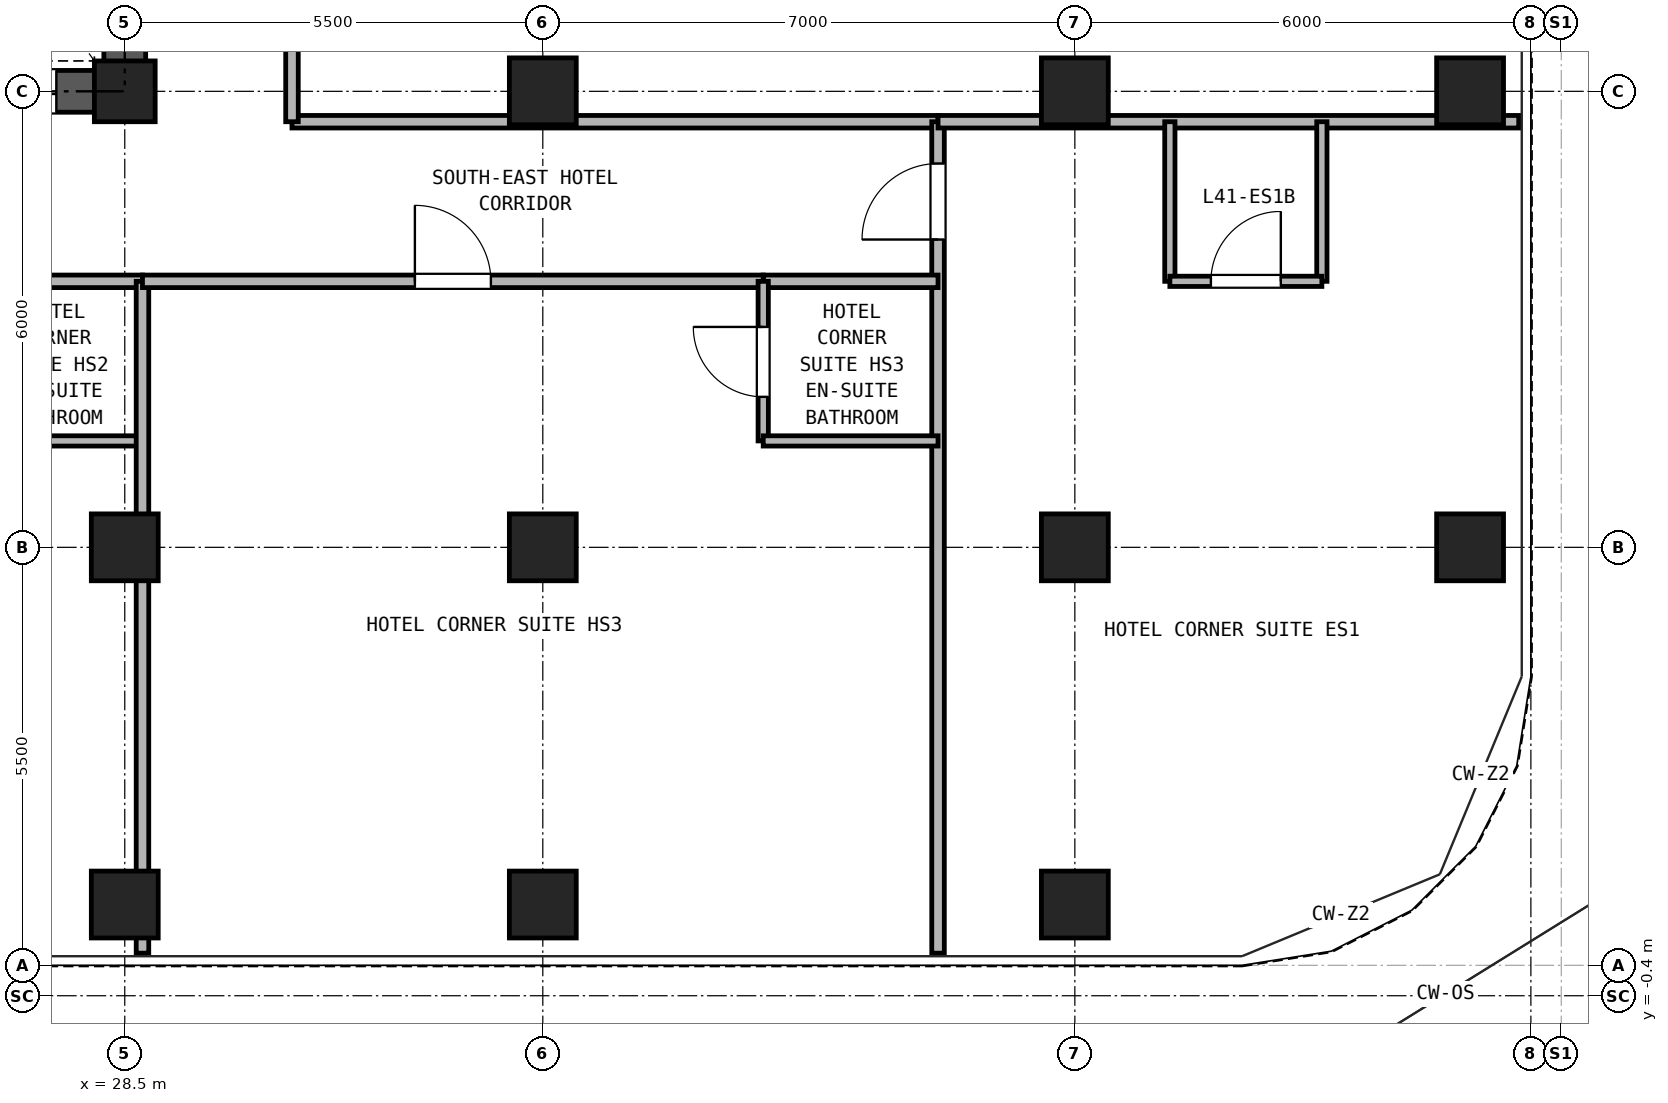
"""IFC4 building model, lengths in metres.
Left out: names, types, materials, properties, quantities, classifications, styles, units other than length and angle.
Written with IfcOpenShell. Run it as: python <this file> out.ifc"""

import sys

from ifc_helpers import new_model, si_unit, direction, frame, frame_2d, origin, origin_2d, place, context, subcontext, project, spatial, rectangle, hollow_rectangle, extrude, source, transform, mapped, element, fill, save


model = new_model("IFC4")
c1 = context("Model", 3, precision=1e-05, world=origin(), true_north=direction((0.0, 1.0)))
c2 = subcontext(c1, "Body", "Model", "MODEL_VIEW")
j1 = project(units=[si_unit("LENGTHUNIT", "METRE"), si_unit("PLANEANGLEUNIT", "RADIAN")], contexts=[c1])
p1 = place(None, origin())
s1 = spatial("IfcSite", under=j1, at=p1, CompositionType="ELEMENT")
p2 = place(p1, origin())
s2 = spatial("IfcBuilding", under=s1, at=p2, CompositionType="ELEMENT")
p3 = place(p2, frame((0.0, 0.0, 148.4)))
s3 = spatial("IfcBuildingStorey", under=s2, at=p3, CompositionType="ELEMENT", Elevation=148.4)
m1 = source(origin(), c2, "Body", "SweptSolid", [
    extrude(hollow_rectangle(XDim=0.88, YDim=0.88, WallThickness=0.05, at=origin_2d()), origin(), (0.0, 0.0, 1.0), 2.84),
])
for number, where, z_axis, x_axis in (
    (1, (28.5, 0.8, 0.0), (0.0, 0.0, 1.0), (1.0, 0.0, 0.0)),
    (2, (34.0, 0.8, 0.0), (0.0, 0.0, 1.0), (1.0, 0.0, 0.0)),
    (3, (41.0, 0.8, 0.0), (0.0, 0.0, 1.0), (1.0, 0.0, 0.0)),
    (4, (46.2, 5.5, 0.0), (0.0, 0.0, 1.0), (1.0, 0.0, 0.0)),
    (5, (46.2, 11.5, 0.0), (0.0, 0.0, 1.0), (1.0, 0.0, 0.0)),
    (6, (28.5, 5.5, 0.0), (0.0, 0.0, 1.0), (1.0, 0.0, 0.0)),
):
    element("IfcColumn", number, at=place(p3, frame(where, z_axis=z_axis, x_axis=x_axis)), inside=s3, PredefinedType="COLUMN", context=c2, shape_type="MappedRepresentation", body=[
        mapped(m1, transform((0.0, 0.0, 0.0), x_axis=(1.0, 0.0, 0.0), y_axis=(0.0, 1.0, 0.0), z_axis=(0.0, 0.0, 1.0), scale=1.0)),
    ])
m2 = source(origin(), c2, "Body", "SweptSolid", [
    extrude(hollow_rectangle(XDim=0.8, YDim=0.8, WallThickness=0.045, at=origin_2d()), origin(), (0.0, 0.0, 1.0), 2.84),
])
p4 = place(p3, frame((28.5, 11.5, 0.0), z_axis=(0.0, 0.0, 1.0), x_axis=(1.0, 0.0, 0.0)))
e7 = element("IfcColumn", 7, at=p4, inside=s3, PredefinedType="COLUMN", context=c2, shape_type="MappedRepresentation", body=[
    mapped(m2, transform((0.0, 0.0, 0.0), x_axis=(1.0, 0.0, 0.0), y_axis=(0.0, 1.0, 0.0), z_axis=(0.0, 0.0, 1.0), scale=1.0)),
])
for number, where, z_axis, x_axis in (
    (8, (34.0, 5.5, 0.0), (0.0, 0.0, 1.0), (1.0, 0.0, 0.0)),
    (9, (34.0, 11.5, 0.0), (0.0, 0.0, 1.0), (1.0, 0.0, 0.0)),
    (10, (41.0, 5.5, 0.0), (0.0, 0.0, 1.0), (1.0, 0.0, 0.0)),
    (11, (41.0, 11.5, 0.0), (0.0, 0.0, 1.0), (1.0, 0.0, 0.0)),
):
    element("IfcColumn", number, at=place(p3, frame(where, z_axis=z_axis, x_axis=x_axis)), inside=s3, PredefinedType="COLUMN", context=c2, shape_type="MappedRepresentation", body=[
        mapped(m1, transform((0.0, 0.0, 0.0), x_axis=(1.0, 0.0, 0.0), y_axis=(0.0, 1.0, 0.0), z_axis=(0.0, 0.0, 1.0), scale=1.0)),
    ])
p5 = place(p3, frame((18.225, 11.5, 0.0), z_axis=(0.0, 0.0, 1.0), x_axis=(1.0, 0.0, 0.0)))
e12 = element("IfcWall", 12, at=p5, inside=s3, PredefinedType="SHEAR", context=c2, shape_type="SweptSolid", body=[
    extrude(rectangle(XDim=10.55, YDim=0.55, at=frame_2d((5.275, 0.0))), origin(), (0.0, 0.0, 1.0), 2.84),
])
p6 = place(p5, frame((2.375, 0.0, 0.0)))
e13 = element("IfcOpeningElement", 13, at=p6, cuts=e12, PredefinedType="OPENING", context=c2, shape_type="SweptSolid", body=[
    extrude(rectangle(XDim=0.95, YDim=2.15, at=frame_2d((0.475, 1.075))), frame((0.0, 0.285, 0.0), z_axis=(0.0, -1.0, 0.0), x_axis=(1.0, 0.0, 0.0)), (0.0, 0.0, 1.0), 0.57),
])
p7 = place(p5, frame((5.875, 0.0, 0.0)))
e14 = element("IfcOpeningElement", 14, at=p7, cuts=e12, PredefinedType="OPENING", context=c2, shape_type="SweptSolid", body=[
    extrude(rectangle(XDim=1.1, YDim=2.25, at=frame_2d((0.55, 1.125))), frame((0.0, 0.285, 0.0), z_axis=(0.0, -1.0, 0.0), x_axis=(1.0, 0.0, 0.0)), (0.0, 0.0, 1.0), 0.57),
])
p8 = place(p5, frame((8.275, 0.0, 0.0)))
e15 = element("IfcOpeningElement", 15, at=p8, cuts=e12, PredefinedType="OPENING", context=c2, shape_type="SweptSolid", body=[
    extrude(rectangle(XDim=1.1, YDim=2.25, at=frame_2d((0.55, 1.125))), frame((0.0, 0.285, 0.0), z_axis=(0.0, -1.0, 0.0), x_axis=(1.0, 0.0, 0.0)), (0.0, 0.0, 1.0), 0.57),
])
p9 = place(p3, frame((28.5, 11.775, 0.0), z_axis=(0.0, 0.0, 1.0), x_axis=(0.0, 1.0, 0.0)))
e16 = element("IfcWall", 16, at=p9, inside=s3, PredefinedType="SHEAR", context=c2, shape_type="SweptSolid", body=[
    extrude(rectangle(XDim=16.7, YDim=0.55, at=frame_2d((8.35, 0.0))), origin(), (0.0, 0.0, 1.0), 2.84),
])
p10 = place(p9, frame((7.375, 0.0, 0.0)))
e17 = element("IfcOpeningElement", 17, at=p10, cuts=e16, PredefinedType="OPENING", context=c2, shape_type="SweptSolid", body=[
    extrude(rectangle(XDim=1.15, YDim=2.2, at=frame_2d((0.575, 1.1))), frame((0.0, 0.285, 0.0), z_axis=(0.0, -1.0, 0.0), x_axis=(1.0, 0.0, 0.0)), (0.0, 0.0, 1.0), 0.57),
])
p11 = place(p3, frame((30.7, 11.1, 0.0), z_axis=(0.0, 0.0, 1.0), x_axis=(1.0, 0.0, 0.0)))
e18 = element("IfcWall", 18, at=p11, inside=s3, PredefinedType="PARTITIONING", context=c2, shape_type="SweptSolid", body=[
    extrude(rectangle(XDim=8.5, YDim=0.165, at=frame_2d((4.25, 0.0))), origin(), (0.0, 0.0, 1.0), 2.84),
])
p12 = place(p3, frame((30.7, 11.1, 0.0), z_axis=(0.0, 0.0, 1.0), x_axis=(0.0, 1.0, 0.0)))
e19 = element("IfcWall", 19, at=p12, inside=s3, PredefinedType="PARTITIONING", context=c2, shape_type="SweptSolid", body=[
    extrude(rectangle(XDim=18.5, YDim=0.165, at=frame_2d((9.25, 0.0))), origin(), (0.0, 0.0, 1.0), 2.84),
])
p13 = place(p12, frame((8.75, 0.0, 0.0)))
e20 = element("IfcOpeningElement", 20, at=p13, cuts=e19, PredefinedType="OPENING", context=c2, shape_type="SweptSolid", body=[
    extrude(rectangle(XDim=0.95, YDim=2.15, at=frame_2d((0.475, 1.075))), frame((0.0, 0.093, 0.0), z_axis=(0.0, -1.0, 0.0), x_axis=(1.0, 0.0, 0.0)), (0.0, 0.0, 1.0), 0.185),
])
p14 = place(p3, frame((39.2, 0.16, 0.0), z_axis=(0.0, 0.0, 1.0), x_axis=(0.0, 1.0, 0.0)))
e21 = element("IfcWall", 21, at=p14, inside=s3, PredefinedType="PARTITIONING", context=c2, shape_type="SweptSolid", body=[
    extrude(rectangle(XDim=10.94, YDim=0.165, at=frame_2d((5.47, 0.0))), origin(), (0.0, 0.0, 1.0), 2.84),
])
p15 = place(p14, frame((9.39, 0.0, 0.0)))
e22 = element("IfcOpeningElement", 22, at=p15, cuts=e21, PredefinedType="OPENING", context=c2, shape_type="SweptSolid", body=[
    extrude(rectangle(XDim=1.0, YDim=2.15, at=frame_2d((0.5, 1.075))), frame((0.0, 0.093, 0.0), z_axis=(0.0, -1.0, 0.0), x_axis=(1.0, 0.0, 0.0)), (0.0, 0.0, 1.0), 0.185),
])
p16 = place(p3, frame((39.2, 11.1, 0.0), z_axis=(0.0, 0.0, 1.0), x_axis=(1.0, 0.0, 0.0)))
e23 = element("IfcWall", 23, at=p16, inside=s3, PredefinedType="PARTITIONING", context=c2, shape_type="SweptSolid", body=[
    extrude(rectangle(XDim=7.64, YDim=0.165, at=frame_2d((3.82, 0.0))), origin(), (0.0, 0.0, 1.0), 2.84),
])
for number, where, z_axis, x_axis in (
    (24, (42.25, 9.0, 0.0), (0.0, 0.0, 1.0), (0.0, 1.0, 0.0)),
    (25, (44.25, 9.0, 0.0), (0.0, 0.0, 1.0), (0.0, 1.0, 0.0)),
):
    element("IfcWall", number, at=place(p3, frame(where, z_axis=z_axis, x_axis=x_axis)), inside=s3, PredefinedType="PARTITIONING", context=c2, shape_type="SweptSolid", body=[
        extrude(rectangle(XDim=2.1, YDim=0.135, at=frame_2d((1.05, 0.0))), origin(), (0.0, 0.0, 1.0), 2.84),
    ])
p17 = place(p3, frame((42.25, 9.0, 0.0), z_axis=(0.0, 0.0, 1.0), x_axis=(1.0, 0.0, 0.0)))
e26 = element("IfcWall", 26, at=p17, inside=s3, PredefinedType="PARTITIONING", context=c2, shape_type="SweptSolid", body=[
    extrude(rectangle(XDim=2.0, YDim=0.135, at=frame_2d((1.0, 0.0))), origin(), (0.0, 0.0, 1.0), 2.84),
])
p18 = place(p17, frame((0.54, 0.0, 0.0)))
e27 = element("IfcOpeningElement", 27, at=p18, cuts=e26, PredefinedType="OPENING", context=c2, shape_type="SweptSolid", body=[
    extrude(rectangle(XDim=0.92, YDim=2.1, at=frame_2d((0.46, 1.05))), frame((0.0, 0.077, 0.0), z_axis=(0.0, -1.0, 0.0), x_axis=(1.0, 0.0, 0.0)), (0.0, 0.0, 1.0), 0.155),
])
p19 = place(p3, frame((26.433, 9.0, 0.0), z_axis=(0.0, 0.0, 1.0), x_axis=(1.0, 0.0, 0.0)))
e28 = element("IfcWall", 28, at=p19, inside=s3, PredefinedType="PARTITIONING", context=c2, shape_type="SweptSolid", body=[
    extrude(rectangle(XDim=2.3, YDim=0.165, at=frame_2d((1.15, 0.0))), origin(), (0.0, 0.0, 1.0), 2.84),
])
p20 = place(p3, frame((26.433, 6.9, 0.0), z_axis=(0.0, 0.0, 1.0), x_axis=(1.0, 0.0, 0.0)))
e29 = element("IfcWall", 29, at=p20, inside=s3, PredefinedType="PARTITIONING", context=c2, shape_type="SweptSolid", body=[
    extrude(rectangle(XDim=2.3, YDim=0.135, at=frame_2d((1.15, 0.0))), origin(), (0.0, 0.0, 1.0), 2.84),
])
p21 = place(p3, frame((28.733, 0.16, 0.0), z_axis=(0.0, 0.0, 1.0), x_axis=(0.0, 1.0, 0.0)))
e30 = element("IfcWall", 30, at=p21, inside=s3, PredefinedType="PARTITIONING", context=c2, shape_type="SweptSolid", body=[
    extrude(rectangle(XDim=8.84, YDim=0.165, at=frame_2d((4.42, 0.0))), origin(), (0.0, 0.0, 1.0), 2.137),
])
p22 = place(p3, frame((36.9, 9.0, 0.0), z_axis=(0.0, 0.0, 1.0), x_axis=(1.0, 0.0, 0.0)))
e31 = element("IfcWall", 31, at=p22, inside=s3, PredefinedType="PARTITIONING", context=c2, shape_type="SweptSolid", body=[
    extrude(rectangle(XDim=2.3, YDim=0.165, at=frame_2d((1.15, 0.0))), origin(), (0.0, 0.0, 1.0), 2.84),
])
p23 = place(p3, frame((28.733, 9.0, 0.0), z_axis=(0.0, 0.0, 1.0), x_axis=(1.0, 0.0, 0.0)))
e32 = element("IfcWall", 32, at=p23, inside=s3, PredefinedType="PARTITIONING", context=c2, shape_type="SweptSolid", body=[
    extrude(rectangle(XDim=8.167, YDim=0.165, at=frame_2d((4.083, 0.0))), origin(), (0.0, 0.0, 1.0), 2.84),
])
p24 = place(p23, frame((3.584, 0.0, 0.0)))
e33 = element("IfcOpeningElement", 33, at=p24, cuts=e32, PredefinedType="OPENING", context=c2, shape_type="SweptSolid", body=[
    extrude(rectangle(XDim=1.0, YDim=2.15, at=frame_2d((0.5, 1.075))), frame((0.0, 0.093, 0.0), z_axis=(0.0, -1.0, 0.0), x_axis=(1.0, 0.0, 0.0)), (0.0, 0.0, 1.0), 0.185),
])
p25 = place(p3, frame((36.9, 6.9, 0.0), z_axis=(0.0, 0.0, 1.0), x_axis=(0.0, 1.0, 0.0)))
e34 = element("IfcWall", 34, at=p25, inside=s3, PredefinedType="PARTITIONING", context=c2, shape_type="SweptSolid", body=[
    extrude(rectangle(XDim=2.1, YDim=0.135, at=frame_2d((1.05, 0.0))), origin(), (0.0, 0.0, 1.0), 2.84),
])
p26 = place(p25, frame((0.58, 0.0, 0.0)))
e35 = element("IfcOpeningElement", 35, at=p26, cuts=e34, PredefinedType="OPENING", context=c2, shape_type="SweptSolid", body=[
    extrude(rectangle(XDim=0.92, YDim=2.1, at=frame_2d((0.46, 1.05))), frame((0.0, 0.077, 0.0), z_axis=(0.0, -1.0, 0.0), x_axis=(1.0, 0.0, 0.0)), (0.0, 0.0, 1.0), 0.155),
])
p27 = place(p3, frame((36.9, 6.9, 0.0), z_axis=(0.0, 0.0, 1.0), x_axis=(1.0, 0.0, 0.0)))
e36 = element("IfcWall", 36, at=p27, inside=s3, PredefinedType="PARTITIONING", context=c2, shape_type="SweptSolid", body=[
    extrude(rectangle(XDim=2.3, YDim=0.135, at=frame_2d((1.15, 0.0))), origin(), (0.0, 0.0, 1.0), 2.84),
])
p28 = place(p8, frame((1.1, 0.0, 0.0), z_axis=(0.0, 0.0, 1.0), x_axis=(-1.0, 0.0, 0.0)))
e37 = element("IfcDoor", 37, at=p28, inside=s3, OperationType="DOUBLE_DOOR_SLIDING", PredefinedType="DOOR", context=c2, shape_type="SweptSolid", body=[
    extrude(rectangle(XDim=1.1, YDim=2.25, at=frame_2d((0.55, 1.125))), frame((0.0, 0.025, 0.0), z_axis=(0.0, -1.0, 0.0), x_axis=(1.0, 0.0, 0.0)), (0.0, 0.0, 1.0), 0.05),
])
fill(e15, e37)
p29 = place(p18, origin())
e38 = element("IfcDoor", 38, at=p29, inside=s3, OperationType="SINGLE_SWING_RIGHT", PredefinedType="DOOR", context=c2, shape_type="SweptSolid", body=[
    extrude(rectangle(XDim=0.92, YDim=2.1, at=frame_2d((0.46, 1.05))), frame((0.0, 0.025, 0.0), z_axis=(0.0, -1.0, 0.0), x_axis=(1.0, 0.0, 0.0)), (0.0, 0.0, 1.0), 0.05),
])
fill(e27, e38)
p30 = place(p15, frame((1.0, 0.0, 0.0), z_axis=(0.0, 0.0, 1.0), x_axis=(-1.0, 0.0, 0.0)))
e39 = element("IfcDoor", 39, at=p30, inside=s3, OperationType="SINGLE_SWING_LEFT", PredefinedType="DOOR", context=c2, shape_type="SweptSolid", body=[
    extrude(rectangle(XDim=1.0, YDim=2.15, at=frame_2d((0.5, 1.075))), frame((0.0, 0.025, 0.0), z_axis=(0.0, -1.0, 0.0), x_axis=(1.0, 0.0, 0.0)), (0.0, 0.0, 1.0), 0.05),
])
fill(e22, e39)
p31 = place(p26, origin())
e40 = element("IfcDoor", 40, at=p31, inside=s3, OperationType="SINGLE_SWING_RIGHT", PredefinedType="DOOR", context=c2, shape_type="SweptSolid", body=[
    extrude(rectangle(XDim=0.92, YDim=2.1, at=frame_2d((0.46, 1.05))), frame((0.0, 0.025, 0.0), z_axis=(0.0, -1.0, 0.0), x_axis=(1.0, 0.0, 0.0)), (0.0, 0.0, 1.0), 0.05),
])
fill(e35, e40)
p32 = place(p24, frame((1.0, 0.0, 0.0), z_axis=(0.0, 0.0, 1.0), x_axis=(-1.0, 0.0, 0.0)))
e41 = element("IfcDoor", 41, at=p32, inside=s3, OperationType="SINGLE_SWING_LEFT", PredefinedType="DOOR", context=c2, shape_type="SweptSolid", body=[
    extrude(rectangle(XDim=1.0, YDim=2.15, at=frame_2d((0.5, 1.075))), frame((0.0, 0.025, 0.0), z_axis=(0.0, -1.0, 0.0), x_axis=(1.0, 0.0, 0.0)), (0.0, 0.0, 1.0), 0.05),
])
fill(e33, e41)
save(model, sys.argv[1])
